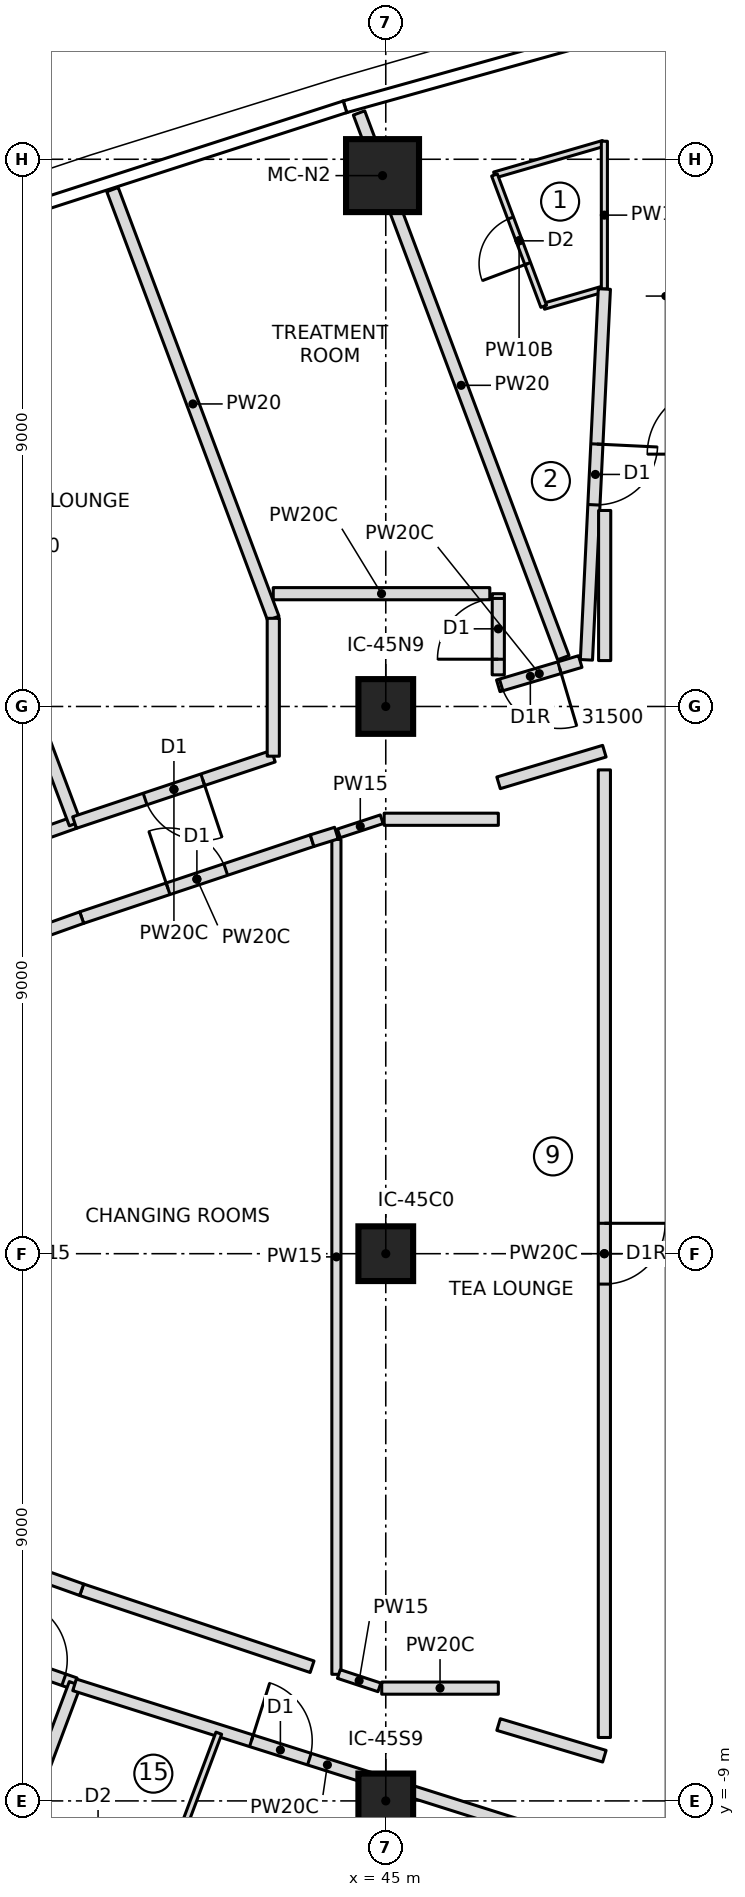
"""IFC4 building model, lengths in metres.
Left out: names, types, materials, properties, quantities, classifications, styles, units other than length and angle.
Written with IfcOpenShell. Run it as: python <this file> out.ifc"""

import sys

from ifc_helpers import new_model, si_unit, direction, frame, frame_2d, origin, origin_2d, place, context, subcontext, project, spatial, rectangle, extrude, element, fill, save


model = new_model("IFC4")
c1 = context("Model", 3, precision=1e-05, world=origin(), true_north=direction((0.0, 1.0)))
c2 = subcontext(c1, "Body", "Model", "MODEL_VIEW")
j1 = project(units=[si_unit("LENGTHUNIT", "METRE"), si_unit("PLANEANGLEUNIT", "RADIAN")], contexts=[c1])
p1 = place(None, origin())
s1 = spatial("IfcSite", under=j1, at=p1, CompositionType="ELEMENT")
p2 = place(p1, origin())
s2 = spatial("IfcBuilding", under=s1, at=p2, CompositionType="ELEMENT")
p3 = place(p2, frame((0.0, 0.0, 245.65)))
s3 = spatial("IfcBuildingStorey", under=s2, at=p3, CompositionType="ELEMENT", Elevation=245.65)
p4 = place(p3, frame((44.947, 17.731, 0.0), z_axis=(0.0, 0.0, 1.0), x_axis=(1.0, 0.0, 0.0)))
e1 = element("IfcColumn", 1, at=p4, inside=s3, PredefinedType="COLUMN", context=c2, shape_type="SweptSolid", body=[
    extrude(rectangle(XDim=1.2, YDim=1.2, at=origin_2d()), origin(), (0.0, 0.0, 1.0), 3.55),
])
for number, where, z_axis, x_axis in (
    (2, (45.0, -9.0, 0.0), (0.0, 0.0, 1.0), (1.0, 0.0, 0.0)),
    (3, (45.0, 0.0, 0.0), (0.0, 0.0, 1.0), (1.0, 0.0, 0.0)),
    (4, (45.0, 9.0, 0.0), (0.0, 0.0, 1.0), (1.0, 0.0, 0.0)),
):
    element("IfcColumn", number, at=place(p3, frame(where, z_axis=z_axis, x_axis=x_axis)), inside=s3, PredefinedType="COLUMN", context=c2, shape_type="SweptSolid", body=[
        extrude(rectangle(XDim=0.9, YDim=0.9, at=origin_2d()), origin(), (0.0, 0.0, 1.0), 3.55),
    ])
p5 = place(p3, frame((39.882, 7.091, 0.0), z_axis=(0.0, 0.0, 1.0), x_axis=(-0.942537055217, -0.334101630559, 0.0)))
e5 = element("IfcWall", 5, at=p5, inside=s3, PredefinedType="PARTITIONING", context=c2, shape_type="SweptSolid", body=[
    extrude(rectangle(XDim=4.244, YDim=0.2, at=frame_2d((2.122, 0.0))), origin(), (0.0, 0.0, 1.0), 3.25),
])
p6 = place(p5, frame((1.622, 0.0, 0.0)))
e6 = element("IfcOpeningElement", 6, at=p6, cuts=e5, PredefinedType="OPENING", context=c2, shape_type="SweptSolid", body=[
    extrude(rectangle(XDim=1.0, YDim=2.1, at=frame_2d((0.5, 1.05))), frame((0.0, 0.11, 0.0), z_axis=(0.0, -1.0, 0.0), x_axis=(1.0, 0.0, 0.0)), (0.0, 0.0, 1.0), 0.22),
])
p7 = place(p3, frame((39.889, 7.072, 0.0), z_axis=(0.0, 0.0, 1.0), x_axis=(-0.35112895446, 0.936327110224, 0.0)))
e7 = element("IfcWall", 7, at=p7, inside=s3, PredefinedType="PARTITIONING", context=c2, shape_type="SweptSolid", body=[
    extrude(rectangle(XDim=9.706, YDim=0.2, at=frame_2d((4.853, 0.0))), origin(), (0.0, 0.0, 1.0), 3.25),
])
p8 = place(p3, frame((43.15, 8.183, 0.0), z_axis=(0.0, 0.0, 1.0), x_axis=(-0.948477584784, -0.316844238013, 0.0)))
e8 = element("IfcWall", 8, at=p8, inside=s3, PredefinedType="PARTITIONING", context=c2, shape_type="SweptSolid", body=[
    extrude(rectangle(XDim=3.445, YDim=0.2, at=frame_2d((1.723, 0.0))), origin(), (0.0, 0.0, 1.0), 3.25),
])
p9 = place(p8, frame((1.222, 0.0, 0.0)))
e9 = element("IfcOpeningElement", 9, at=p9, cuts=e8, PredefinedType="OPENING", context=c2, shape_type="SweptSolid", body=[
    extrude(rectangle(XDim=1.0, YDim=2.1, at=frame_2d((0.5, 1.05))), frame((0.0, 0.11, 0.0), z_axis=(0.0, -1.0, 0.0), x_axis=(1.0, 0.0, 0.0)), (0.0, 0.0, 1.0), 0.22),
])
p10 = place(p3, frame((43.15, 10.45, 0.0), z_axis=(0.0, 0.0, 1.0), x_axis=(-0.351119888923, 0.936330509811, 0.0)))
e10 = element("IfcWall", 10, at=p10, inside=s3, PredefinedType="PARTITIONING", context=c2, shape_type="SweptSolid", body=[
    extrude(rectangle(XDim=7.531, YDim=0.2, at=frame_2d((3.766, 0.0))), origin(), (0.0, 0.0, 1.0), 3.25),
])
p11 = place(p3, frame((48.198, 9.739, 0.0), z_axis=(0.0, 0.0, 1.0), x_axis=(-0.958866391875, -0.283857785753, 0.0)))
e11 = element("IfcWall", 11, at=p11, inside=s3, PredefinedType="PARTITIONING", context=c2, shape_type="SweptSolid", body=[
    extrude(rectangle(XDim=1.406, YDim=0.2, at=frame_2d((0.703, 0.0))), origin(), (0.0, 0.0, 1.0), 3.25),
])
p12 = place(p11, frame((0.356, 0.0, 0.0)))
e12 = element("IfcOpeningElement", 12, at=p12, cuts=e11, PredefinedType="OPENING", context=c2, shape_type="SweptSolid", body=[
    extrude(rectangle(XDim=1.0, YDim=2.1, at=frame_2d((0.5, 1.05))), frame((0.0, 0.11, 0.0), z_axis=(0.0, -1.0, 0.0), x_axis=(1.0, 0.0, 0.0)), (0.0, 0.0, 1.0), 0.22),
])
p13 = place(p3, frame((47.92, 9.803, 0.0), z_axis=(0.0, 0.0, 1.0), x_axis=(-0.351123441588, 0.936329177569, 0.0)))
e13 = element("IfcWall", 13, at=p13, inside=s3, PredefinedType="PARTITIONING", context=c2, shape_type="SweptSolid", body=[
    extrude(rectangle(XDim=9.568, YDim=0.2, at=frame_2d((4.784, 0.0))), origin(), (0.0, 0.0, 1.0), 3.25),
])
p14 = place(p3, frame((46.788, 17.741, 0.0), z_axis=(0.0, 0.0, 1.0), x_axis=(0.960473980386, 0.278369777458, 0.0)))
e14 = element("IfcWall", 14, at=p14, inside=s3, PredefinedType="PARTITIONING", context=c2, shape_type="SweptSolid", body=[
    extrude(rectangle(XDim=1.864, YDim=0.1, at=frame_2d((0.932, 0.0))), origin(), (0.0, 0.0, 1.0), 3.25),
])
p15 = place(p3, frame((48.576, 15.865, 0.0), z_axis=(0.0, 0.0, 1.0), x_axis=(-0.960468222897, -0.278389642057, 0.0)))
e15 = element("IfcWall", 15, at=p15, inside=s3, PredefinedType="PARTITIONING", context=c2, shape_type="SweptSolid", body=[
    extrude(rectangle(XDim=1.019, YDim=0.1, at=frame_2d((0.51, 0.0))), origin(), (0.0, 0.0, 1.0), 3.25),
])
p16 = place(p3, frame((47.598, 15.582, 0.0), z_axis=(0.0, 0.0, 1.0), x_axis=(-0.351158236187, 0.936316128857, 0.0)))
e16 = element("IfcWall", 16, at=p16, inside=s3, PredefinedType="PARTITIONING", context=c2, shape_type="SweptSolid", body=[
    extrude(rectangle(XDim=2.307, YDim=0.1, at=frame_2d((1.153, 0.0))), origin(), (0.0, 0.0, 1.0), 3.25),
])
p17 = place(p16, frame((0.75, 0.0, 0.0)))
e17 = element("IfcOpeningElement", 17, at=p17, cuts=e16, PredefinedType="OPENING", context=c2, shape_type="SweptSolid", body=[
    extrude(rectangle(XDim=0.8, YDim=2.1, at=frame_2d((0.4, 1.05))), frame((0.0, 0.06, 0.0), z_axis=(0.0, -1.0, 0.0), x_axis=(1.0, 0.0, 0.0)), (0.0, 0.0, 1.0), 0.12),
])
p18 = place(p3, frame((35.882, -5.673, 0.0), z_axis=(0.0, 0.0, 1.0), x_axis=(0.944107376821, -0.329638075823, 0.0)))
e18 = element("IfcWall", 18, at=p18, inside=s3, PredefinedType="PARTITIONING", context=c2, shape_type="SweptSolid", body=[
    extrude(rectangle(XDim=4.245, YDim=0.2, at=frame_2d((2.122, 0.0))), origin(), (0.0, 0.0, 1.0), 3.25),
])
p19 = place(p18, frame((3.05, 0.0, 0.0)))
e19 = element("IfcOpeningElement", 19, at=p19, cuts=e18, PredefinedType="OPENING", context=c2, shape_type="SweptSolid", body=[
    extrude(rectangle(XDim=1.0, YDim=2.1, at=frame_2d((0.5, 1.05))), frame((0.0, 0.11, 0.0), z_axis=(0.0, -1.0, 0.0), x_axis=(1.0, 0.0, 0.0)), (0.0, 0.0, 1.0), 0.22),
])
p20 = place(p3, frame((36.481, -16.161, 0.0), z_axis=(0.0, 0.0, 1.0), x_axis=(0.35112895446, 0.936327110224, 0.0)))
e20 = element("IfcWall", 20, at=p20, inside=s3, PredefinedType="PARTITIONING", context=c2, shape_type="SweptSolid", body=[
    extrude(rectangle(XDim=9.706, YDim=0.2, at=frame_2d((4.853, 0.0))), origin(), (0.0, 0.0, 1.0), 3.25),
])
p21 = place(p3, frame((39.882, -7.091, 0.0), z_axis=(0.0, 0.0, 1.0), x_axis=(0.953395918068, -0.301722096326, 0.0)))
e21 = element("IfcWall", 21, at=p21, inside=s3, PredefinedType="PARTITIONING", context=c2, shape_type="SweptSolid", body=[
    extrude(rectangle(XDim=8.722, YDim=0.2, at=frame_2d((4.361, 0.0))), origin(), (0.0, 0.0, 1.0), 3.25),
])
p22 = place(p21, frame((3.05, 0.0, 0.0)))
e22 = element("IfcOpeningElement", 22, at=p22, cuts=e21, PredefinedType="OPENING", context=c2, shape_type="SweptSolid", body=[
    extrude(rectangle(XDim=1.0, YDim=2.1, at=frame_2d((0.5, 1.05))), frame((0.0, 0.11, 0.0), z_axis=(0.0, -1.0, 0.0), x_axis=(1.0, 0.0, 0.0)), (0.0, 0.0, 1.0), 0.22),
])
p23 = place(p3, frame((42.254, -7.886, 0.0), z_axis=(0.0, 0.0, 1.0), x_axis=(-0.351111699725, -0.936333580684, 0.0)))
e23 = element("IfcWall", 23, at=p23, inside=s3, PredefinedType="PARTITIONING", context=c2, shape_type="SweptSolid", body=[
    extrude(rectangle(XDim=2.279, YDim=0.1, at=frame_2d((1.139, 0.0))), origin(), (0.0, 0.0, 1.0), 3.25),
])
p24 = place(p3, frame((41.454, -10.02, 0.0), z_axis=(0.0, 0.0, 1.0), x_axis=(-0.948497709953, 0.316783986676, 0.0)))
e24 = element("IfcWall", 24, at=p24, inside=s3, PredefinedType="PARTITIONING", context=c2, shape_type="SweptSolid", body=[
    extrude(rectangle(XDim=2.502, YDim=0.1, at=frame_2d((1.251, 0.0))), origin(), (0.0, 0.0, 1.0), 3.25),
])
p25 = place(p24, frame((0.85, 0.0, 0.0)))
e25 = element("IfcOpeningElement", 25, at=p25, cuts=e24, PredefinedType="OPENING", context=c2, shape_type="SweptSolid", body=[
    extrude(rectangle(XDim=0.8, YDim=2.1, at=frame_2d((0.4, 1.05))), frame((0.0, 0.06, 0.0), z_axis=(0.0, -1.0, 0.0), x_axis=(1.0, 0.0, 0.0)), (0.0, 0.0, 1.0), 0.12),
])
p26 = place(p3, frame((39.999, 5.527, 0.0), z_axis=(0.0, 0.0, 1.0), x_axis=(0.948469186567, 0.316869377084, 0.0)))
e26 = element("IfcWall", 26, at=p26, inside=s3, PredefinedType="PARTITIONING", context=c2, shape_type="SweptSolid", body=[
    extrude(rectangle(XDim=3.995, YDim=0.2, at=frame_2d((1.998, 0.0))), origin(), (0.0, 0.0, 1.0), 3.25),
])
p27 = place(p26, frame((1.498, 0.0, 0.0)))
e27 = element("IfcOpeningElement", 27, at=p27, cuts=e26, PredefinedType="OPENING", context=c2, shape_type="SweptSolid", body=[
    extrude(rectangle(XDim=1.0, YDim=2.1, at=frame_2d((0.5, 1.05))), frame((0.0, 0.11, 0.0), z_axis=(0.0, -1.0, 0.0), x_axis=(1.0, 0.0, 0.0)), (0.0, 0.0, 1.0), 0.22),
])
p28 = place(p3, frame((43.788, -6.793, 0.0), z_axis=(0.0, 0.0, 1.0), x_axis=(-0.948469186567, 0.316869377084, 0.0)))
e28 = element("IfcWall", 28, at=p28, inside=s3, PredefinedType="PARTITIONING", context=c2, shape_type="SweptSolid", body=[
    extrude(rectangle(XDim=3.995, YDim=0.2, at=frame_2d((1.998, 0.0))), origin(), (0.0, 0.0, 1.0), 3.25),
])
for number, where, z_axis, x_axis in (
    (29, (39.999, -5.527, 0.0), (0.0, 0.0, 1.0), (-0.942, 0.336, 0.0)),
    (30, (38.674, 5.055, 0.0), (0.0, 0.0, 1.0), (0.942, 0.336, 0.0)),
):
    element("IfcWall", number, at=place(p3, frame(where, z_axis=z_axis, x_axis=x_axis)), inside=s3, PredefinedType="PARTITIONING", context=c2, shape_type="SweptSolid", body=[
        extrude(rectangle(XDim=1.407, YDim=0.2, at=frame_2d((0.704, 0.0))), origin(), (0.0, 0.0, 1.0), 3.25),
    ])
p29 = place(p3, frame((44.188, -6.918, 0.0), z_axis=(0.0, 0.0, 1.0), x_axis=(0.0, 1.0, 0.0)))
e31 = element("IfcWall", 31, at=p29, inside=s3, PredefinedType="PARTITIONING", context=c2, shape_type="SweptSolid", body=[
    extrude(rectangle(XDim=13.731, YDim=0.15, at=frame_2d((6.866, 0.0))), origin(), (0.0, 0.0, 1.0), 3.25),
])
p30 = place(p3, frame((48.595, 18.296, 0.0), z_axis=(0.0, 0.0, 1.0), x_axis=(0.0, -1.0, 0.0)))
e32 = element("IfcWall", 32, at=p30, inside=s3, PredefinedType="PARTITIONING", context=c2, shape_type="SweptSolid", body=[
    extrude(rectangle(XDim=2.431, YDim=0.1, at=frame_2d((1.215, 0.0))), origin(), (0.0, 0.0, 1.0), 3.25),
])
p31 = place(p3, frame((48.595, 7.957, 0.0), z_axis=(0.0, 0.0, 1.0), x_axis=(0.0, -1.0, 0.0)))
e33 = element("IfcWall", 33, at=p31, inside=s3, PredefinedType="PARTITIONING", context=c2, shape_type="SweptSolid", body=[
    extrude(rectangle(XDim=15.914, YDim=0.2, at=frame_2d((7.957, 0.0))), origin(), (0.0, 0.0, 1.0), 3.25),
])
p32 = place(p31, frame((7.457, 0.0, 0.0)))
e34 = element("IfcOpeningElement", 34, at=p32, cuts=e33, PredefinedType="OPENING", context=c2, shape_type="SweptSolid", body=[
    extrude(rectangle(XDim=1.0, YDim=2.1, at=frame_2d((0.5, 1.05))), frame((0.0, 0.11, 0.0), z_axis=(0.0, -1.0, 0.0), x_axis=(1.0, 0.0, 0.0)), (0.0, 0.0, 1.0), 0.22),
])
p33 = place(p3, frame((48.595, 15.866, 0.0), z_axis=(0.0, 0.0, 1.0), x_axis=(-0.048302241024, -0.998832765538, 0.0)))
e35 = element("IfcWall", 35, at=p33, inside=s3, PredefinedType="PARTITIONING", context=c2, shape_type="SweptSolid", body=[
    extrude(rectangle(XDim=6.106, YDim=0.2, at=frame_2d((3.053, 0.0))), origin(), (0.0, 0.0, 1.0), 3.25),
])
p34 = place(p33, frame((2.553, 0.0, 0.0)))
e36 = element("IfcOpeningElement", 36, at=p34, cuts=e35, PredefinedType="OPENING", context=c2, shape_type="SweptSolid", body=[
    extrude(rectangle(XDim=1.0, YDim=2.1, at=frame_2d((0.5, 1.05))), frame((0.0, 0.11, 0.0), z_axis=(0.0, -1.0, 0.0), x_axis=(1.0, 0.0, 0.0)), (0.0, 0.0, 1.0), 0.22),
])
p35 = place(p3, frame((44.228, 6.913, 0.0), z_axis=(0.0, 0.0, 1.0), x_axis=(0.949957891139, 0.312377984279, 0.0)))
e37 = element("IfcWall", 37, at=p35, inside=s3, PredefinedType="PARTITIONING", context=c2, shape_type="SweptSolid", body=[
    extrude(rectangle(XDim=0.742, YDim=0.15, at=frame_2d((0.371, 0.0))), origin(), (0.0, 0.0, 1.0), 3.25),
])
p36 = place(p3, frame((44.973, 7.145, 0.0), z_axis=(0.0, 0.0, 1.0), x_axis=(0.999999991552, 0.0001299883, 0.0)))
e38 = element("IfcWall", 38, at=p36, inside=s3, PredefinedType="PARTITIONING", context=c2, shape_type="SweptSolid", body=[
    extrude(rectangle(XDim=1.878, YDim=0.2, at=frame_2d((0.939, 0.0))), origin(), (0.0, 0.0, 1.0), 3.25),
])
for number, where, z_axis, x_axis in (
    (39, (46.855, 7.744, 0.0), (0.0, 0.0, 1.0), (0.958, 0.287, 0.0)),
    (40, (48.595, -8.265, 0.0), (0.0, 0.0, 1.0), (-0.958, 0.287, 0.0)),
):
    element("IfcWall", number, at=place(p3, frame(where, z_axis=z_axis, x_axis=x_axis)), inside=s3, PredefinedType="PARTITIONING", context=c2, shape_type="SweptSolid", body=[
        extrude(rectangle(XDim=1.816, YDim=0.2, at=frame_2d((0.908, 0.0))), origin(), (0.0, 0.0, 1.0), 3.25),
    ])
p37 = place(p3, frame((46.852, -7.145, 0.0), z_axis=(0.0, 0.0, 1.0), x_axis=(-0.999999991898, 0.000127291241, 0.0)))
e41 = element("IfcWall", 41, at=p37, inside=s3, PredefinedType="PARTITIONING", context=c2, shape_type="SweptSolid", body=[
    extrude(rectangle(XDim=1.918, YDim=0.2, at=frame_2d((0.959, 0.0))), origin(), (0.0, 0.0, 1.0), 3.25),
])
p38 = place(p3, frame((44.896, -7.133, 0.0), z_axis=(0.0, 0.0, 1.0), x_axis=(-0.94982393739, 0.312785050732, 0.0)))
e42 = element("IfcWall", 42, at=p38, inside=s3, PredefinedType="PARTITIONING", context=c2, shape_type="SweptSolid", body=[
    extrude(rectangle(XDim=0.702, YDim=0.15, at=frame_2d((0.351, 0.0))), origin(), (0.0, 0.0, 1.0), 3.25),
])
p39 = place(p3, frame((43.15, 10.45, 0.0), z_axis=(0.0, 0.0, 1.0), x_axis=(0.0, -1.0, 0.0)))
e43 = element("IfcWall", 43, at=p39, inside=s3, PredefinedType="PARTITIONING", context=c2, shape_type="SweptSolid", body=[
    extrude(rectangle(XDim=2.267, YDim=0.2, at=frame_2d((1.134, 0.0))), origin(), (0.0, 0.0, 1.0), 3.25),
])
p40 = place(p3, frame((46.85, 9.52, 0.0), z_axis=(0.0, 0.0, 1.0), x_axis=(0.0007315287, 0.999999732433, 0.0)))
e44 = element("IfcWall", 44, at=p40, inside=s3, PredefinedType="PARTITIONING", context=c2, shape_type="SweptSolid", body=[
    extrude(rectangle(XDim=1.335, YDim=0.2, at=frame_2d((0.667, 0.0))), origin(), (0.0, 0.0, 1.0), 3.25),
])
p41 = place(p40, frame((0.257, 0.0, 0.0)))
e45 = element("IfcOpeningElement", 45, at=p41, cuts=e44, PredefinedType="OPENING", context=c2, shape_type="SweptSolid", body=[
    extrude(rectangle(XDim=1.0, YDim=2.1, at=frame_2d((0.5, 1.05))), frame((0.0, 0.11, 0.0), z_axis=(0.0, -1.0, 0.0), x_axis=(1.0, 0.0, 0.0)), (0.0, 0.0, 1.0), 0.22),
])
p42 = place(p3, frame((43.788, 6.793, 0.0), z_axis=(0.0, 0.0, 1.0), x_axis=(0.95462504626, 0.297810377679, 0.0)))
e46 = element("IfcWall", 46, at=p42, inside=s3, PredefinedType="PARTITIONING", context=c2, shape_type="SweptSolid", body=[
    extrude(rectangle(XDim=0.419, YDim=0.2, at=frame_2d((0.209, 0.0))), origin(), (0.0, 0.0, 1.0), 3.25),
])
p43 = place(p3, frame((46.711, 10.855, 0.0), z_axis=(0.0, 0.0, 1.0), x_axis=(-1.0, 0.0, 0.0)))
e47 = element("IfcWall", 47, at=p43, inside=s3, PredefinedType="PARTITIONING", context=c2, shape_type="SweptSolid", body=[
    extrude(rectangle(XDim=3.562, YDim=0.2, at=frame_2d((1.781, 0.0))), origin(), (0.0, 0.0, 1.0), 3.25),
])
p44 = place(p3, frame((48.6, 9.755, 0.0), z_axis=(0.0, 0.0, 1.0), x_axis=(0.0, 1.0, 0.0)))
e48 = element("IfcWall", 48, at=p44, inside=s3, PredefinedType="PARTITIONING", context=c2, shape_type="SweptSolid", body=[
    extrude(rectangle(XDim=2.469, YDim=0.2, at=frame_2d((1.234, 0.0))), origin(), (0.0, 0.0, 1.0), 3.25),
])
p45 = place(p9, origin())
e49 = element("IfcDoor", 49, at=p45, inside=s3, OperationType="SINGLE_SWING_LEFT", PredefinedType="DOOR", context=c2, shape_type="SweptSolid", body=[
    extrude(rectangle(XDim=1.0, YDim=2.1, at=frame_2d((0.5, 1.05))), frame((0.0, 0.025, 0.0), z_axis=(0.0, -1.0, 0.0), x_axis=(1.0, 0.0, 0.0)), (0.0, 0.0, 1.0), 0.05),
])
fill(e9, e49)
p46 = place(p12, origin())
e50 = element("IfcDoor", 50, at=p46, inside=s3, OperationType="SINGLE_SWING_RIGHT", PredefinedType="DOOR", context=c2, shape_type="SweptSolid", body=[
    extrude(rectangle(XDim=1.0, YDim=2.1, at=frame_2d((0.5, 1.05))), frame((0.0, 0.025, 0.0), z_axis=(0.0, -1.0, 0.0), x_axis=(1.0, 0.0, 0.0)), (0.0, 0.0, 1.0), 0.05),
])
fill(e12, e50)
p47 = place(p17, origin())
e51 = element("IfcDoor", 51, at=p47, inside=s3, OperationType="SINGLE_SWING_LEFT", PredefinedType="DOOR", context=c2, shape_type="SweptSolid", body=[
    extrude(rectangle(XDim=0.8, YDim=2.1, at=frame_2d((0.4, 1.05))), frame((0.0, 0.025, 0.0), z_axis=(0.0, -1.0, 0.0), x_axis=(1.0, 0.0, 0.0)), (0.0, 0.0, 1.0), 0.05),
])
fill(e17, e51)
p48 = place(p19, origin())
e52 = element("IfcDoor", 52, at=p48, inside=s3, OperationType="SINGLE_SWING_LEFT", PredefinedType="DOOR", context=c2, shape_type="SweptSolid", body=[
    extrude(rectangle(XDim=1.0, YDim=2.1, at=frame_2d((0.5, 1.05))), frame((0.0, 0.025, 0.0), z_axis=(0.0, -1.0, 0.0), x_axis=(1.0, 0.0, 0.0)), (0.0, 0.0, 1.0), 0.05),
])
fill(e19, e52)
p49 = place(p22, origin())
e53 = element("IfcDoor", 53, at=p49, inside=s3, OperationType="SINGLE_SWING_LEFT", PredefinedType="DOOR", context=c2, shape_type="SweptSolid", body=[
    extrude(rectangle(XDim=1.0, YDim=2.1, at=frame_2d((0.5, 1.05))), frame((0.0, 0.025, 0.0), z_axis=(0.0, -1.0, 0.0), x_axis=(1.0, 0.0, 0.0)), (0.0, 0.0, 1.0), 0.05),
])
fill(e22, e53)
p50 = place(p27, origin())
e54 = element("IfcDoor", 54, at=p50, inside=s3, OperationType="SINGLE_SWING_LEFT", PredefinedType="DOOR", context=c2, shape_type="SweptSolid", body=[
    extrude(rectangle(XDim=1.0, YDim=2.1, at=frame_2d((0.5, 1.05))), frame((0.0, 0.025, 0.0), z_axis=(0.0, -1.0, 0.0), x_axis=(1.0, 0.0, 0.0)), (0.0, 0.0, 1.0), 0.05),
])
fill(e27, e54)
p51 = place(p32, origin())
e55 = element("IfcDoor", 55, at=p51, inside=s3, OperationType="SINGLE_SWING_RIGHT", PredefinedType="DOOR", context=c2, shape_type="SweptSolid", body=[
    extrude(rectangle(XDim=1.0, YDim=2.1, at=frame_2d((0.5, 1.05))), frame((0.0, 0.025, 0.0), z_axis=(0.0, -1.0, 0.0), x_axis=(1.0, 0.0, 0.0)), (0.0, 0.0, 1.0), 0.05),
])
fill(e34, e55)
p52 = place(p34, origin())
e56 = element("IfcDoor", 56, at=p52, inside=s3, OperationType="SINGLE_SWING_LEFT", PredefinedType="DOOR", context=c2, shape_type="SweptSolid", body=[
    extrude(rectangle(XDim=1.0, YDim=2.1, at=frame_2d((0.5, 1.05))), frame((0.0, 0.025, 0.0), z_axis=(0.0, -1.0, 0.0), x_axis=(1.0, 0.0, 0.0)), (0.0, 0.0, 1.0), 0.05),
])
fill(e36, e56)
p53 = place(p41, origin())
e57 = element("IfcDoor", 57, at=p53, inside=s3, OperationType="SINGLE_SWING_LEFT", PredefinedType="DOOR", context=c2, shape_type="SweptSolid", body=[
    extrude(rectangle(XDim=1.0, YDim=2.1, at=frame_2d((0.5, 1.05))), frame((0.0, 0.025, 0.0), z_axis=(0.0, -1.0, 0.0), x_axis=(1.0, 0.0, 0.0)), (0.0, 0.0, 1.0), 0.05),
])
fill(e45, e57)
save(model, sys.argv[1])
